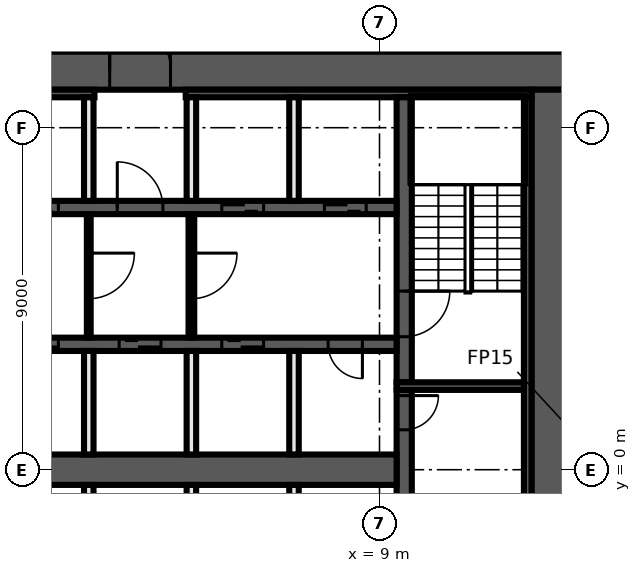
"""IFC4 building model, lengths in metres.
Left out: names, types, materials, properties, quantities, classifications, styles, units other than length and angle.
Written with IfcOpenShell. Run it as: python <this file> out.ifc"""

import sys

from ifc_helpers import new_model, si_unit, direction, frame, frame_2d, origin, place, context, subcontext, project, spatial, rectangle, extrude, element, fill, save


model = new_model("IFC4")
c1 = context("Model", 3, precision=1e-05, world=origin(), true_north=direction((0.0, 1.0)))
c2 = subcontext(c1, "Body", "Model", "MODEL_VIEW")
j1 = project(units=[si_unit("LENGTHUNIT", "METRE"), si_unit("PLANEANGLEUNIT", "RADIAN")], contexts=[c1])
p1 = place(None, origin())
s1 = spatial("IfcSite", under=j1, at=p1, CompositionType="ELEMENT")
p2 = place(p1, origin())
s2 = spatial("IfcBuilding", under=s1, at=p2, CompositionType="ELEMENT")
p3 = place(p2, frame((0.0, 0.0, 135.9)))
s3 = spatial("IfcBuildingStorey", under=s2, at=p3, CompositionType="ELEMENT", Elevation=135.9)
for number, where, z_axis, x_axis in (
    (1, (3.6, 11.0, 0.0), (0.0, 0.0, 1.0), (0.0, 1.0, 0.0)),
    (2, (1.8, 11.0, 0.0), (0.0, 0.0, 1.0), (0.0, 1.0, 0.0)),
):
    element("IfcWall", number, at=place(p3, frame(where, z_axis=z_axis, x_axis=x_axis)), inside=s3, PredefinedType="PARTITIONING", context=c2, shape_type="SweptSolid", body=[
        extrude(rectangle(XDim=0.925, YDim=0.15, at=frame_2d((0.462, 0.0))), origin(), (0.0, 0.0, 1.0), 3.3),
    ])
p4 = place(p3, frame((-14.0, 10.5, 0.0), z_axis=(0.0, 0.0, 1.0), x_axis=(1.0, 0.0, 0.0)))
e3 = element("IfcWall", 3, at=p4, inside=s3, PredefinedType="SHEAR", context=c2, shape_type="SweptSolid", body=[
    extrude(rectangle(XDim=28.0, YDim=1.0, at=frame_2d((14.0, 0.0))), origin(), (0.0, 0.0, 1.0), 3.3),
])
p5 = place(p4, frame((15.9, 0.0, 0.0)))
e4 = element("IfcOpeningElement", 4, at=p5, cuts=e3, PredefinedType="OPENING", context=c2, shape_type="SweptSolid", body=[
    extrude(rectangle(XDim=1.6, YDim=2.1, at=frame_2d((0.8, 1.05))), frame((0.0, 0.51, 0.0), z_axis=(0.0, -1.0, 0.0), x_axis=(1.0, 0.0, 0.0)), (0.0, 0.0, 1.0), 1.02),
])
p6 = place(p3, frame((13.5, 10.0, 0.0), z_axis=(0.0, 0.0, 1.0), x_axis=(0.0, -1.0, 0.0)))
e5 = element("IfcWall", 5, at=p6, inside=s3, PredefinedType="SHEAR", context=c2, shape_type="SweptSolid", body=[
    extrude(rectangle(XDim=20.0, YDim=1.0, at=frame_2d((10.0, 0.0))), origin(), (0.0, 0.0, 1.0), 3.3),
])
p7 = place(p3, frame((-13.0, 9.9, 0.0), z_axis=(0.0, 0.0, 1.0), x_axis=(1.0, 0.0, 0.0)))
e6 = element("IfcWall", 6, at=p7, inside=s3, PredefinedType="SHEAR", context=c2, shape_type="SweptSolid", body=[
    extrude(rectangle(XDim=14.5, YDim=0.2, at=frame_2d((7.25, 0.0))), origin(), (0.0, 0.0, 1.0), 3.3),
])
p8 = place(p3, frame((3.9, 9.9, 0.0), z_axis=(0.0, 0.0, 1.0), x_axis=(1.0, 0.0, 0.0)))
e7 = element("IfcWall", 7, at=p8, inside=s3, PredefinedType="SHEAR", context=c2, shape_type="SweptSolid", body=[
    extrude(rectangle(XDim=9.1, YDim=0.2, at=frame_2d((4.55, 0.0))), origin(), (0.0, 0.0, 1.0), 3.3),
])
p9 = place(p3, frame((12.9, 9.8, 0.0), z_axis=(0.0, 0.0, 1.0), x_axis=(0.0, -1.0, 0.0)))
e8 = element("IfcWall", 8, at=p9, inside=s3, PredefinedType="SHEAR", context=c2, shape_type="SweptSolid", body=[
    extrude(rectangle(XDim=19.6, YDim=0.2, at=frame_2d((9.8, 0.0))), origin(), (0.0, 0.0, 1.0), 3.3),
])
p10 = place(p3, frame((9.65, 2.1, 0.0), z_axis=(0.0, 0.0, 1.0), x_axis=(0.0, -1.0, 0.0)))
e9 = element("IfcWall", 9, at=p10, inside=s3, PredefinedType="SHEAR", context=c2, shape_type="SweptSolid", body=[
    extrude(rectangle(XDim=4.2, YDim=0.4, at=frame_2d((2.1, 0.0))), origin(), (0.0, 0.0, 1.0), 3.3),
])
p11 = place(p10, frame((0.15, 0.0, 0.0)))
e10 = element("IfcOpeningElement", 10, at=p11, cuts=e9, PredefinedType="OPENING", context=c2, shape_type="SweptSolid", body=[
    extrude(rectangle(XDim=0.9, YDim=2.1, at=frame_2d((0.45, 1.05))), frame((0.0, 0.21, 0.0), z_axis=(0.0, -1.0, 0.0), x_axis=(1.0, 0.0, 0.0)), (0.0, 0.0, 1.0), 0.42),
])
p12 = place(p3, frame((9.65, 9.8, 0.0), z_axis=(0.0, 0.0, 1.0), x_axis=(0.0, -1.0, 0.0)))
e11 = element("IfcWall", 11, at=p12, inside=s3, PredefinedType="SHEAR", context=c2, shape_type="SweptSolid", body=[
    extrude(rectangle(XDim=7.5, YDim=0.4, at=frame_2d((3.75, 0.0))), origin(), (0.0, 0.0, 1.0), 3.3),
])
p13 = place(p12, frame((5.1, 0.0, 0.0)))
e12 = element("IfcOpeningElement", 12, at=p13, cuts=e11, PredefinedType="OPENING", context=c2, shape_type="SweptSolid", body=[
    extrude(rectangle(XDim=1.2, YDim=2.1, at=frame_2d((0.6, 1.05))), frame((0.0, 0.21, 0.0), z_axis=(0.0, -1.0, 0.0), x_axis=(1.0, 0.0, 0.0)), (0.0, 0.0, 1.0), 0.42),
])
p14 = place(p3, frame((9.45, 2.2, 0.0), z_axis=(0.0, 0.0, 1.0), x_axis=(1.0, 0.0, 0.0)))
e13 = element("IfcWall", 13, at=p14, inside=s3, PredefinedType="SHEAR", context=c2, shape_type="SweptSolid", body=[
    extrude(rectangle(XDim=3.35, YDim=0.2, at=frame_2d((1.675, 0.0))), origin(), (0.0, 0.0, 1.0), 3.3),
])
p15 = place(p3, frame((-9.45, 6.9, 0.0), z_axis=(0.0, 0.0, 1.0), x_axis=(1.0, 0.0, 0.0)))
e14 = element("IfcWall", 14, at=p15, inside=s3, PredefinedType="SHEAR", context=c2, shape_type="SweptSolid", body=[
    extrude(rectangle(XDim=18.9, YDim=0.35, at=frame_2d((9.45, 0.0))), origin(), (0.0, 0.0, 1.0), 3.3),
])
p16 = place(p15, frame((0.8, 0.0, 0.0)))
e15 = element("IfcOpeningElement", 15, at=p16, cuts=e14, PredefinedType="OPENING", context=c2, shape_type="SweptSolid", body=[
    extrude(rectangle(XDim=1.1, YDim=2.1, at=frame_2d((0.55, 1.05))), frame((0.0, 0.185, 0.0), z_axis=(0.0, -1.0, 0.0), x_axis=(1.0, 0.0, 0.0)), (0.0, 0.0, 1.0), 0.37),
])
p17 = place(p15, frame((3.5, 0.0, 0.0)))
e16 = element("IfcOpeningElement", 16, at=p17, cuts=e14, PredefinedType="OPENING", context=c2, shape_type="SweptSolid", body=[
    extrude(rectangle(XDim=1.1, YDim=2.1, at=frame_2d((0.55, 1.05))), frame((0.0, 0.185, 0.0), z_axis=(0.0, -1.0, 0.0), x_axis=(1.0, 0.0, 0.0)), (0.0, 0.0, 1.0), 0.37),
])
p18 = place(p15, frame((6.2, 0.0, 0.0)))
e17 = element("IfcOpeningElement", 17, at=p18, cuts=e14, PredefinedType="OPENING", context=c2, shape_type="SweptSolid", body=[
    extrude(rectangle(XDim=1.1, YDim=2.1, at=frame_2d((0.55, 1.05))), frame((0.0, 0.185, 0.0), z_axis=(0.0, -1.0, 0.0), x_axis=(1.0, 0.0, 0.0)), (0.0, 0.0, 1.0), 0.37),
])
p19 = place(p15, frame((8.9, 0.0, 0.0)))
e18 = element("IfcOpeningElement", 18, at=p19, cuts=e14, PredefinedType="OPENING", context=c2, shape_type="SweptSolid", body=[
    extrude(rectangle(XDim=1.1, YDim=2.1, at=frame_2d((0.55, 1.05))), frame((0.0, 0.185, 0.0), z_axis=(0.0, -1.0, 0.0), x_axis=(1.0, 0.0, 0.0)), (0.0, 0.0, 1.0), 0.37),
])
p20 = place(p15, frame((11.55, 0.0, 0.0)))
e19 = element("IfcOpeningElement", 19, at=p20, cuts=e14, PredefinedType="OPENING", context=c2, shape_type="SweptSolid", body=[
    extrude(rectangle(XDim=1.2, YDim=2.1, at=frame_2d((0.6, 1.05))), frame((0.0, 0.185, 0.0), z_axis=(0.0, -1.0, 0.0), x_axis=(1.0, 0.0, 0.0)), (0.0, 0.0, 1.0), 0.37),
])
p21 = place(p15, frame((14.3, 0.0, 0.0)))
e20 = element("IfcOpeningElement", 20, at=p21, cuts=e14, PredefinedType="OPENING", context=c2, shape_type="SweptSolid", body=[
    extrude(rectangle(XDim=1.1, YDim=2.1, at=frame_2d((0.55, 1.05))), frame((0.0, 0.185, 0.0), z_axis=(0.0, -1.0, 0.0), x_axis=(1.0, 0.0, 0.0)), (0.0, 0.0, 1.0), 0.37),
])
p22 = place(p15, frame((17.0, 0.0, 0.0)))
e21 = element("IfcOpeningElement", 21, at=p22, cuts=e14, PredefinedType="OPENING", context=c2, shape_type="SweptSolid", body=[
    extrude(rectangle(XDim=1.1, YDim=2.1, at=frame_2d((0.55, 1.05))), frame((0.0, 0.185, 0.0), z_axis=(0.0, -1.0, 0.0), x_axis=(1.0, 0.0, 0.0)), (0.0, 0.0, 1.0), 0.37),
])
p23 = place(p3, frame((9.45, 3.3, 0.0), z_axis=(0.0, 0.0, 1.0), x_axis=(-1.0, 0.0, 0.0)))
e22 = element("IfcWall", 22, at=p23, inside=s3, PredefinedType="SHEAR", context=c2, shape_type="SweptSolid", body=[
    extrude(rectangle(XDim=18.9, YDim=0.35, at=frame_2d((9.45, 0.0))), origin(), (0.0, 0.0, 1.0), 3.3),
])
p24 = place(p23, frame((17.0, 0.0, 0.0)))
e23 = element("IfcOpeningElement", 23, at=p24, cuts=e22, PredefinedType="OPENING", context=c2, shape_type="SweptSolid", body=[
    extrude(rectangle(XDim=1.1, YDim=2.1, at=frame_2d((0.55, 1.05))), frame((0.0, 0.185, 0.0), z_axis=(0.0, -1.0, 0.0), x_axis=(1.0, 0.0, 0.0)), (0.0, 0.0, 1.0), 0.37),
])
p25 = place(p23, frame((14.3, 0.0, 0.0)))
e24 = element("IfcOpeningElement", 24, at=p25, cuts=e22, PredefinedType="OPENING", context=c2, shape_type="SweptSolid", body=[
    extrude(rectangle(XDim=1.1, YDim=2.1, at=frame_2d((0.55, 1.05))), frame((0.0, 0.185, 0.0), z_axis=(0.0, -1.0, 0.0), x_axis=(1.0, 0.0, 0.0)), (0.0, 0.0, 1.0), 0.37),
])
p26 = place(p23, frame((11.6, 0.0, 0.0)))
e25 = element("IfcOpeningElement", 25, at=p26, cuts=e22, PredefinedType="OPENING", context=c2, shape_type="SweptSolid", body=[
    extrude(rectangle(XDim=1.1, YDim=2.1, at=frame_2d((0.55, 1.05))), frame((0.0, 0.185, 0.0), z_axis=(0.0, -1.0, 0.0), x_axis=(1.0, 0.0, 0.0)), (0.0, 0.0, 1.0), 0.37),
])
p27 = place(p23, frame((8.9, 0.0, 0.0)))
e26 = element("IfcOpeningElement", 26, at=p27, cuts=e22, PredefinedType="OPENING", context=c2, shape_type="SweptSolid", body=[
    extrude(rectangle(XDim=1.1, YDim=2.1, at=frame_2d((0.55, 1.05))), frame((0.0, 0.185, 0.0), z_axis=(0.0, -1.0, 0.0), x_axis=(1.0, 0.0, 0.0)), (0.0, 0.0, 1.0), 0.37),
])
p28 = place(p23, frame((6.2, 0.0, 0.0)))
e27 = element("IfcOpeningElement", 27, at=p28, cuts=e22, PredefinedType="OPENING", context=c2, shape_type="SweptSolid", body=[
    extrude(rectangle(XDim=1.1, YDim=2.1, at=frame_2d((0.55, 1.05))), frame((0.0, 0.185, 0.0), z_axis=(0.0, -1.0, 0.0), x_axis=(1.0, 0.0, 0.0)), (0.0, 0.0, 1.0), 0.37),
])
p29 = place(p23, frame((3.5, 0.0, 0.0)))
e28 = element("IfcOpeningElement", 28, at=p29, cuts=e22, PredefinedType="OPENING", context=c2, shape_type="SweptSolid", body=[
    extrude(rectangle(XDim=1.1, YDim=2.1, at=frame_2d((0.55, 1.05))), frame((0.0, 0.185, 0.0), z_axis=(0.0, -1.0, 0.0), x_axis=(1.0, 0.0, 0.0)), (0.0, 0.0, 1.0), 0.37),
])
p30 = place(p23, frame((0.9, 0.0, 0.0)))
e29 = element("IfcOpeningElement", 29, at=p30, cuts=e22, PredefinedType="OPENING", context=c2, shape_type="SweptSolid", body=[
    extrude(rectangle(XDim=0.9, YDim=2.1, at=frame_2d((0.45, 1.05))), frame((0.0, 0.185, 0.0), z_axis=(0.0, -1.0, 0.0), x_axis=(1.0, 0.0, 0.0)), (0.0, 0.0, 1.0), 0.37),
])
p31 = place(p3, frame((-9.45, 0.0, 0.0), z_axis=(0.0, 0.0, 1.0), x_axis=(1.0, 0.0, 0.0)))
e30 = element("IfcWall", 30, at=p31, inside=s3, PredefinedType="SHEAR", context=c2, shape_type="SweptSolid", body=[
    extrude(rectangle(XDim=18.9, YDim=0.8, at=frame_2d((9.45, 0.0))), origin(), (0.0, 0.0, 1.0), 3.3),
])
for number, where, z_axis, x_axis in (
    (31, (6.75, -3.125, 0.0), (0.0, 0.0, 1.0), (0.0, 1.0, 0.0)),
    (32, (6.75, 0.4, 0.0), (0.0, 0.0, 1.0), (0.0, 1.0, 0.0)),
    (33, (6.75, 7.075, 0.0), (0.0, 0.0, 1.0), (0.0, 1.0, 0.0)),
):
    element("IfcWall", number, at=place(p3, frame(where, z_axis=z_axis, x_axis=x_axis)), inside=s3, PredefinedType="SOLIDWALL", context=c2, shape_type="SweptSolid", body=[
        extrude(rectangle(XDim=2.725, YDim=0.25, at=frame_2d((1.363, 0.0))), origin(), (0.0, 0.0, 1.0), 3.3),
    ])
p32 = place(p3, frame((4.05, 6.725, 0.0), z_axis=(0.0, 0.0, 1.0), x_axis=(0.0, -1.0, 0.0)))
e34 = element("IfcWall", 34, at=p32, inside=s3, PredefinedType="PARTITIONING", context=c2, shape_type="SweptSolid", body=[
    extrude(rectangle(XDim=3.25, YDim=0.15, at=frame_2d((1.625, 0.0))), origin(), (0.0, 0.0, 1.0), 3.3),
])
p33 = place(p32, frame((1.025, 0.0, 0.0)))
e35 = element("IfcOpeningElement", 35, at=p33, cuts=e34, PredefinedType="OPENING", context=c2, shape_type="SweptSolid", body=[
    extrude(rectangle(XDim=1.2, YDim=2.1, at=frame_2d((0.6, 1.05))), frame((0.0, 0.085, 0.0), z_axis=(0.0, -1.0, 0.0), x_axis=(1.0, 0.0, 0.0)), (0.0, 0.0, 1.0), 0.17),
])
for number, where, z_axis, x_axis in (
    (36, (4.05, -3.125, 0.0), (0.0, 0.0, 1.0), (0.0, 1.0, 0.0)),
    (37, (4.05, 0.4, 0.0), (0.0, 0.0, 1.0), (0.0, 1.0, 0.0)),
    (38, (4.05, 7.075, 0.0), (0.0, 0.0, 1.0), (0.0, 1.0, 0.0)),
):
    element("IfcWall", number, at=place(p3, frame(where, z_axis=z_axis, x_axis=x_axis)), inside=s3, PredefinedType="SOLIDWALL", context=c2, shape_type="SweptSolid", body=[
        extrude(rectangle(XDim=2.725, YDim=0.25, at=frame_2d((1.363, 0.0))), origin(), (0.0, 0.0, 1.0), 3.3),
    ])
p34 = place(p3, frame((1.35, 6.725, 0.0), z_axis=(0.0, 0.0, 1.0), x_axis=(0.0, -1.0, 0.0)))
e39 = element("IfcWall", 39, at=p34, inside=s3, PredefinedType="PARTITIONING", context=c2, shape_type="SweptSolid", body=[
    extrude(rectangle(XDim=3.25, YDim=0.1, at=frame_2d((1.625, 0.0))), origin(), (0.0, 0.0, 1.0), 3.3),
])
p35 = place(p34, frame((1.025, 0.0, 0.0)))
e40 = element("IfcOpeningElement", 40, at=p35, cuts=e39, PredefinedType="OPENING", context=c2, shape_type="SweptSolid", body=[
    extrude(rectangle(XDim=1.2, YDim=2.1, at=frame_2d((0.6, 1.05))), frame((0.0, 0.06, 0.0), z_axis=(0.0, -1.0, 0.0), x_axis=(1.0, 0.0, 0.0)), (0.0, 0.0, 1.0), 0.12),
])
for number, where, z_axis, x_axis in (
    (41, (1.35, -3.125, 0.0), (0.0, 0.0, 1.0), (0.0, 1.0, 0.0)),
    (42, (1.35, 0.4, 0.0), (0.0, 0.0, 1.0), (0.0, 1.0, 0.0)),
    (43, (1.35, 7.075, 0.0), (0.0, 0.0, 1.0), (0.0, 1.0, 0.0)),
):
    element("IfcWall", number, at=place(p3, frame(where, z_axis=z_axis, x_axis=x_axis)), inside=s3, PredefinedType="SOLIDWALL", context=c2, shape_type="SweptSolid", body=[
        extrude(rectangle(XDim=2.725, YDim=0.25, at=frame_2d((1.363, 0.0))), origin(), (0.0, 0.0, 1.0), 3.3),
    ])
p36 = place(p11, origin())
e44 = element("IfcDoor", 44, at=p36, inside=s3, OperationType="SINGLE_SWING_RIGHT", PredefinedType="DOOR", context=c2, shape_type="SweptSolid", body=[
    extrude(rectangle(XDim=0.9, YDim=2.1, at=frame_2d((0.45, 1.05))), frame((0.0, 0.025, 0.0), z_axis=(0.0, -1.0, 0.0), x_axis=(1.0, 0.0, 0.0)), (0.0, 0.0, 1.0), 0.05),
])
fill(e10, e44)
p37 = place(p19, origin())
e45 = element("IfcDoor", 45, at=p37, inside=s3, OperationType="DOUBLE_DOOR_SLIDING", PredefinedType="DOOR", context=c2, shape_type="SweptSolid", body=[
    extrude(rectangle(XDim=1.1, YDim=2.1, at=frame_2d((0.55, 1.05))), frame((0.0, 0.025, 0.0), z_axis=(0.0, -1.0, 0.0), x_axis=(1.0, 0.0, 0.0)), (0.0, 0.0, 1.0), 0.05),
])
fill(e18, e45)
p38 = place(p5, origin())
e46 = element("IfcDoor", 46, at=p38, inside=s3, OperationType="DOUBLE_DOOR_SINGLE_SWING", PredefinedType="DOOR", context=c2, shape_type="SweptSolid", body=[
    extrude(rectangle(XDim=1.6, YDim=2.1, at=frame_2d((0.8, 1.05))), frame((0.0, 0.025, 0.0), z_axis=(0.0, -1.0, 0.0), x_axis=(1.0, 0.0, 0.0)), (0.0, 0.0, 1.0), 0.05),
])
fill(e4, e46)
p39 = place(p20, origin())
e47 = element("IfcDoor", 47, at=p39, inside=s3, OperationType="SINGLE_SWING_LEFT", PredefinedType="DOOR", context=c2, shape_type="SweptSolid", body=[
    extrude(rectangle(XDim=1.2, YDim=2.1, at=frame_2d((0.6, 1.05))), frame((0.0, 0.025, 0.0), z_axis=(0.0, -1.0, 0.0), x_axis=(1.0, 0.0, 0.0)), (0.0, 0.0, 1.0), 0.05),
])
fill(e19, e47)
p40 = place(p21, origin())
e48 = element("IfcDoor", 48, at=p40, inside=s3, OperationType="DOUBLE_DOOR_SLIDING", PredefinedType="DOOR", context=c2, shape_type="SweptSolid", body=[
    extrude(rectangle(XDim=1.1, YDim=2.1, at=frame_2d((0.55, 1.05))), frame((0.0, 0.025, 0.0), z_axis=(0.0, -1.0, 0.0), x_axis=(1.0, 0.0, 0.0)), (0.0, 0.0, 1.0), 0.05),
])
fill(e20, e48)
p41 = place(p22, origin())
e49 = element("IfcDoor", 49, at=p41, inside=s3, OperationType="DOUBLE_DOOR_SLIDING", PredefinedType="DOOR", context=c2, shape_type="SweptSolid", body=[
    extrude(rectangle(XDim=1.1, YDim=2.1, at=frame_2d((0.55, 1.05))), frame((0.0, 0.025, 0.0), z_axis=(0.0, -1.0, 0.0), x_axis=(1.0, 0.0, 0.0)), (0.0, 0.0, 1.0), 0.05),
])
fill(e21, e49)
p42 = place(p27, origin())
e50 = element("IfcDoor", 50, at=p42, inside=s3, OperationType="DOUBLE_DOOR_SLIDING", PredefinedType="DOOR", context=c2, shape_type="SweptSolid", body=[
    extrude(rectangle(XDim=1.1, YDim=2.1, at=frame_2d((0.55, 1.05))), frame((0.0, 0.025, 0.0), z_axis=(0.0, -1.0, 0.0), x_axis=(1.0, 0.0, 0.0)), (0.0, 0.0, 1.0), 0.05),
])
fill(e26, e50)
p43 = place(p28, origin())
e51 = element("IfcDoor", 51, at=p43, inside=s3, OperationType="DOUBLE_DOOR_SLIDING", PredefinedType="DOOR", context=c2, shape_type="SweptSolid", body=[
    extrude(rectangle(XDim=1.1, YDim=2.1, at=frame_2d((0.55, 1.05))), frame((0.0, 0.025, 0.0), z_axis=(0.0, -1.0, 0.0), x_axis=(1.0, 0.0, 0.0)), (0.0, 0.0, 1.0), 0.05),
])
fill(e27, e51)
p44 = place(p29, origin())
e52 = element("IfcDoor", 52, at=p44, inside=s3, OperationType="DOUBLE_DOOR_SLIDING", PredefinedType="DOOR", context=c2, shape_type="SweptSolid", body=[
    extrude(rectangle(XDim=1.1, YDim=2.1, at=frame_2d((0.55, 1.05))), frame((0.0, 0.025, 0.0), z_axis=(0.0, -1.0, 0.0), x_axis=(1.0, 0.0, 0.0)), (0.0, 0.0, 1.0), 0.05),
])
fill(e28, e52)
p45 = place(p30, origin())
e53 = element("IfcDoor", 53, at=p45, inside=s3, OperationType="SINGLE_SWING_LEFT", PredefinedType="DOOR", context=c2, shape_type="SweptSolid", body=[
    extrude(rectangle(XDim=0.9, YDim=2.1, at=frame_2d((0.45, 1.05))), frame((0.0, 0.025, 0.0), z_axis=(0.0, -1.0, 0.0), x_axis=(1.0, 0.0, 0.0)), (0.0, 0.0, 1.0), 0.05),
])
fill(e29, e53)
p46 = place(p13, origin())
e54 = element("IfcDoor", 54, at=p46, inside=s3, OperationType="SINGLE_SWING_LEFT", PredefinedType="DOOR", context=c2, shape_type="SweptSolid", body=[
    extrude(rectangle(XDim=1.2, YDim=2.1, at=frame_2d((0.6, 1.05))), frame((0.0, 0.025, 0.0), z_axis=(0.0, -1.0, 0.0), x_axis=(1.0, 0.0, 0.0)), (0.0, 0.0, 1.0), 0.05),
])
fill(e12, e54)
p47 = place(p35, origin())
e55 = element("IfcDoor", 55, at=p47, inside=s3, OperationType="SINGLE_SWING_LEFT", PredefinedType="DOOR", context=c2, shape_type="SweptSolid", body=[
    extrude(rectangle(XDim=1.2, YDim=2.1, at=frame_2d((0.6, 1.05))), frame((0.0, 0.025, 0.0), z_axis=(0.0, -1.0, 0.0), x_axis=(1.0, 0.0, 0.0)), (0.0, 0.0, 1.0), 0.05),
])
fill(e40, e55)
p48 = place(p33, origin())
e56 = element("IfcDoor", 56, at=p48, inside=s3, OperationType="SINGLE_SWING_RIGHT", PredefinedType="DOOR", context=c2, shape_type="SweptSolid", body=[
    extrude(rectangle(XDim=1.2, YDim=2.1, at=frame_2d((0.6, 1.05))), frame((0.0, 0.025, 0.0), z_axis=(0.0, -1.0, 0.0), x_axis=(1.0, 0.0, 0.0)), (0.0, 0.0, 1.0), 0.05),
])
fill(e35, e56)
save(model, sys.argv[1])
